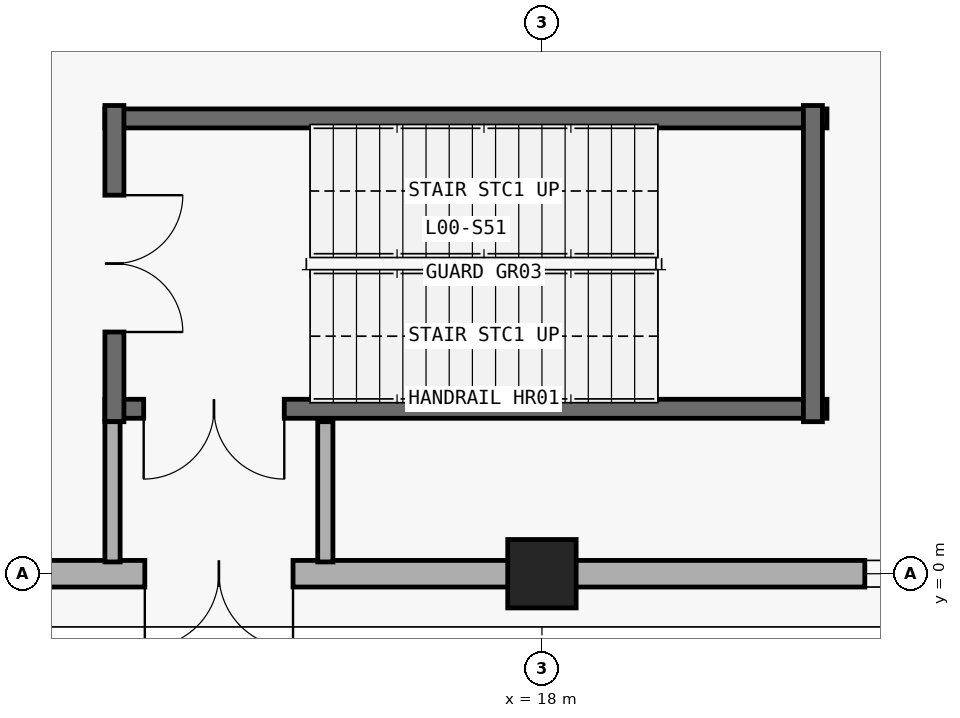
"""IFC4 building model, lengths in metres.
Left out: names, types, materials, properties, quantities, classifications, styles, units other than length and angle.
Written with IfcOpenShell. Run it as: python <this file> out.ifc"""

import sys

from ifc_helpers import new_model, si_unit, direction, frame, frame_2d, origin, origin_2d, place, context, subcontext, project, spatial, rectangle, extrude, element, fill, save


model = new_model("IFC4")
c1 = context("Model", 3, precision=1e-05, world=origin(), true_north=direction((0.0, 1.0)))
c2 = subcontext(c1, "Body", "Model", "MODEL_VIEW")
j1 = project(units=[si_unit("LENGTHUNIT", "METRE"), si_unit("PLANEANGLEUNIT", "RADIAN")], contexts=[c1])
p1 = place(None, origin())
s1 = spatial("IfcSite", under=j1, at=p1, CompositionType="ELEMENT")
p2 = place(p1, origin())
s2 = spatial("IfcBuilding", under=s1, at=p2, CompositionType="ELEMENT")
p3 = place(p2, origin())
s3 = spatial("IfcBuildingStorey", under=s2, at=p3, CompositionType="ELEMENT", Elevation=0.0)
p4 = place(p3, frame((18.0, 0.0, 0.0), z_axis=(0.0, 0.0, 1.0), x_axis=(1.0, 0.0, 0.0)))
e1 = element("IfcColumn", 1, at=p4, inside=s3, PredefinedType="COLUMN", context=c2, shape_type="SweptSolid", body=[
    extrude(rectangle(XDim=0.9, YDim=0.9, at=origin_2d()), origin(), (0.0, 0.0, 1.0), 5.4),
])
p5 = place(p3, frame((26.575, 0.0, 0.0), z_axis=(0.0, 0.0, 1.0), x_axis=(-1.0, 0.0, 0.0)))
e2 = element("IfcWall", 2, at=p5, inside=s3, PredefinedType="STANDARD", context=c2, shape_type="SweptSolid", body=[
    extrude(rectangle(XDim=8.15, YDim=0.35, at=frame_2d((4.075, 0.0))), origin(), (0.0, 0.0, 1.0), 4.384),
])
p6 = place(p5, frame((1.377, 0.0, 0.95)))
e3 = element("IfcOpeningElement", 3, at=p6, cuts=e2, PredefinedType="OPENING", context=c2, shape_type="SweptSolid", body=[
    extrude(rectangle(XDim=2.95, YDim=2.2, at=frame_2d((1.475, 1.1))), frame((0.0, 0.185, 0.0), z_axis=(0.0, -1.0, 0.0), x_axis=(1.0, 0.0, 0.0)), (0.0, 0.0, 1.0), 0.37),
])
p7 = place(p3, frame((17.575, 0.0, 0.0), z_axis=(0.0, 0.0, 1.0), x_axis=(-1.0, 0.0, 0.0)))
e4 = element("IfcWall", 4, at=p7, inside=s3, PredefinedType="STANDARD", context=c2, shape_type="SweptSolid", body=[
    extrude(rectangle(XDim=8.15, YDim=0.35, at=frame_2d((4.075, 0.0))), origin(), (0.0, 0.0, 1.0), 4.384),
])
p8 = place(p7, frame((2.85, 0.0, 0.0)))
e5 = element("IfcOpeningElement", 5, at=p8, cuts=e4, PredefinedType="OPENING", context=c2, shape_type="SweptSolid", body=[
    extrude(rectangle(XDim=1.95, YDim=2.25, at=frame_2d((0.975, 1.125))), frame((0.0, 0.185, 0.0), z_axis=(0.0, -1.0, 0.0), x_axis=(1.0, 0.0, 0.0)), (0.0, 0.0, 1.0), 0.37),
])
p9 = place(p3, frame((21.75, 2.17, 0.0), z_axis=(0.0, 0.0, 1.0), x_axis=(-1.0, 0.0, 0.0)))
e6 = element("IfcWall", 6, at=p9, inside=s3, PredefinedType="SHEAR", context=c2, shape_type="SweptSolid", body=[
    extrude(rectangle(XDim=9.5, YDim=0.25, at=frame_2d((4.75, 0.0))), origin(), (0.0, 0.0, 1.0), 5.1),
])
p10 = place(p9, frame((7.14, 0.0, 0.0)))
e7 = element("IfcOpeningElement", 7, at=p10, cuts=e6, PredefinedType="OPENING", context=c2, shape_type="SweptSolid", body=[
    extrude(rectangle(XDim=1.85, YDim=2.3, at=frame_2d((0.925, 1.15))), frame((0.0, 0.135, 0.0), z_axis=(0.0, -1.0, 0.0), x_axis=(1.0, 0.0, 0.0)), (0.0, 0.0, 1.0), 0.27),
])
p11 = place(p3, frame((21.75, 5.99, 0.0), z_axis=(0.0, 0.0, 1.0), x_axis=(-1.0, 0.0, 0.0)))
e8 = element("IfcWall", 8, at=p11, inside=s3, PredefinedType="SHEAR", context=c2, shape_type="SweptSolid", body=[
    extrude(rectangle(XDim=9.5, YDim=0.25, at=frame_2d((4.75, 0.0))), origin(), (0.0, 0.0, 1.0), 5.1),
])
p12 = place(p3, frame((12.375, 6.16, 0.0), z_axis=(0.0, 0.0, 1.0), x_axis=(0.0, -1.0, 0.0)))
e9 = element("IfcWall", 9, at=p12, inside=s3, PredefinedType="SHEAR", context=c2, shape_type="SweptSolid", body=[
    extrude(rectangle(XDim=4.16, YDim=0.25, at=frame_2d((2.08, 0.0))), origin(), (0.0, 0.0, 1.0), 5.1),
])
p13 = place(p12, frame((1.18, 0.0, 0.0)))
e10 = element("IfcOpeningElement", 10, at=p13, cuts=e9, PredefinedType="OPENING", context=c2, shape_type="SweptSolid", body=[
    extrude(rectangle(XDim=1.8, YDim=2.25, at=frame_2d((0.9, 1.125))), frame((0.0, 0.135, 0.0), z_axis=(0.0, -1.0, 0.0), x_axis=(1.0, 0.0, 0.0)), (0.0, 0.0, 1.0), 0.27),
])
p14 = place(p3, frame((21.565, 2.0, 0.0), z_axis=(0.0, 0.0, 1.0), x_axis=(0.0, 1.0, 0.0)))
e11 = element("IfcWall", 11, at=p14, inside=s3, PredefinedType="SHEAR", context=c2, shape_type="SweptSolid", body=[
    extrude(rectangle(XDim=4.16, YDim=0.25, at=frame_2d((2.08, 0.0))), origin(), (0.0, 0.0, 1.0), 5.1),
])
for number, where, z_axis, x_axis in (
    (12, (12.35, 2.0, 0.0), (0.0, 0.0, 1.0), (0.0, -1.0, 0.0)),
    (13, (15.15, 2.0, 0.0), (0.0, 0.0, 1.0), (0.0, -1.0, 0.0)),
):
    element("IfcWall", number, at=place(p3, frame(where, z_axis=z_axis, x_axis=x_axis)), inside=s3, PredefinedType="PARTITIONING", context=c2, shape_type="SweptSolid", body=[
        extrude(rectangle(XDim=1.845, YDim=0.2, at=frame_2d((0.922, 0.0))), origin(), (0.0, 0.0, 1.0), 4.384),
    ])
p15 = place(p6, origin())
e14 = element("IfcWindow", 14, at=p15, inside=s3, PartitioningType="SINGLE_PANEL", PredefinedType="WINDOW", context=c2, shape_type="SweptSolid", body=[
    extrude(rectangle(XDim=2.95, YDim=2.2, at=frame_2d((1.475, 1.1))), frame((0.0, 0.03, 0.0), z_axis=(0.0, -1.0, 0.0), x_axis=(1.0, 0.0, 0.0)), (0.0, 0.0, 1.0), 0.06),
])
fill(e3, e14)
p16 = place(p8, origin())
e15 = element("IfcDoor", 15, at=p16, inside=s3, OperationType="DOUBLE_DOOR_SINGLE_SWING", PredefinedType="DOOR", context=c2, shape_type="SweptSolid", body=[
    extrude(rectangle(XDim=1.95, YDim=2.25, at=frame_2d((0.975, 1.125))), frame((0.0, 0.025, 0.0), z_axis=(0.0, -1.0, 0.0), x_axis=(1.0, 0.0, 0.0)), (0.0, 0.0, 1.0), 0.05),
])
fill(e5, e15)
p17 = place(p13, origin())
e16 = element("IfcDoor", 16, at=p17, inside=s3, OperationType="DOUBLE_DOOR_SINGLE_SWING", PredefinedType="DOOR", context=c2, shape_type="SweptSolid", body=[
    extrude(rectangle(XDim=1.8, YDim=2.25, at=frame_2d((0.9, 1.125))), frame((0.0, 0.025, 0.0), z_axis=(0.0, -1.0, 0.0), x_axis=(1.0, 0.0, 0.0)), (0.0, 0.0, 1.0), 0.05),
])
fill(e10, e16)
p18 = place(p10, origin())
e17 = element("IfcDoor", 17, at=p18, inside=s3, OperationType="DOUBLE_DOOR_SINGLE_SWING", PredefinedType="DOOR", context=c2, shape_type="SweptSolid", body=[
    extrude(rectangle(XDim=1.85, YDim=2.3, at=frame_2d((0.925, 1.15))), frame((0.0, 0.025, 0.0), z_axis=(0.0, -1.0, 0.0), x_axis=(1.0, 0.0, 0.0)), (0.0, 0.0, 1.0), 0.05),
])
fill(e7, e17)
save(model, sys.argv[1])
